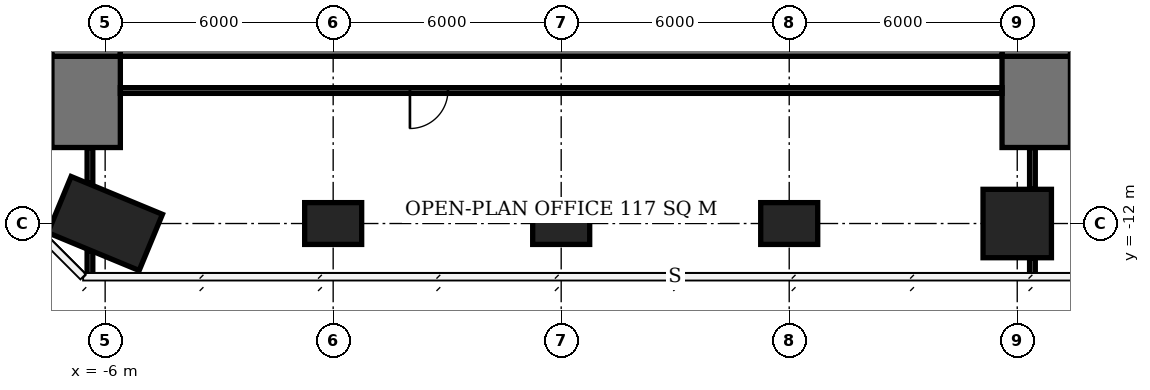
"""IFC4 building model, lengths in metres.
Left out: names, types, materials, properties, quantities, classifications, styles, units other than length and angle.
Written with IfcOpenShell. Run it as: python <this file> out.ifc"""

import sys

from ifc_helpers import new_model, si_unit, direction, frame, frame_2d, origin, origin_2d, place, context, subcontext, project, spatial, rectangle, extrude, element, fill, save


model = new_model("IFC4")
c1 = context("Model", 3, precision=1e-05, world=origin(), true_north=direction((0.0, 1.0)))
c2 = subcontext(c1, "Body", "Model", "MODEL_VIEW")
j1 = project(units=[si_unit("LENGTHUNIT", "METRE"), si_unit("PLANEANGLEUNIT", "RADIAN")], contexts=[c1])
p1 = place(None, origin())
s1 = spatial("IfcSite", under=j1, at=p1, CompositionType="ELEMENT")
p2 = place(p1, origin())
s2 = spatial("IfcBuilding", under=s1, at=p2, CompositionType="ELEMENT")
p3 = place(p2, frame((0.0, 0.0, 185.0)))
s3 = spatial("IfcBuildingStorey", under=s2, at=p3, CompositionType="ELEMENT", Elevation=185.0)
p4 = place(p3, frame((-6.0, -12.0, 0.0), z_axis=(0.0, 0.0, 1.0), x_axis=(-0.923879532511, 0.382683432365, 0.0)))
e1 = element("IfcColumn", 1, at=p4, inside=s3, PredefinedType="COLUMN", context=c2, shape_type="SweptSolid", body=[
    extrude(rectangle(XDim=2.6, YDim=1.6, at=origin_2d()), origin(), (0.0, 0.0, 1.0), 3.9),
])
for number, where, z_axis, x_axis in (
    (2, (0.0, -12.0, 0.0), (0.0, 0.0, 1.0), (1.0, 0.0, 0.0)),
    (3, (6.0, -12.0, 0.0), (0.0, 0.0, 1.0), (1.0, 0.0, 0.0)),
    (4, (12.0, -12.0, 0.0), (0.0, 0.0, 1.0), (1.0, 0.0, 0.0)),
):
    element("IfcColumn", number, at=place(p3, frame(where, z_axis=z_axis, x_axis=x_axis)), inside=s3, PredefinedType="COLUMN", context=c2, shape_type="SweptSolid", body=[
        extrude(rectangle(XDim=1.5, YDim=1.1, at=origin_2d()), origin(), (0.0, 0.0, 1.0), 3.9),
    ])
p5 = place(p3, frame((18.0, -12.0, 0.0), z_axis=(0.0, 0.0, 1.0), x_axis=(1.0, 0.0, 0.0)))
e5 = element("IfcColumn", 5, at=p5, inside=s3, PredefinedType="COLUMN", context=c2, shape_type="SweptSolid", body=[
    extrude(rectangle(XDim=1.8, YDim=1.8, at=origin_2d()), origin(), (0.0, 0.0, 1.0), 3.9),
])
p6 = place(p3, frame((-5.6, -6.6, 0.0), z_axis=(0.0, 0.0, 1.0), x_axis=(1.0, 0.0, 0.0)))
e6 = element("IfcWall", 6, at=p6, inside=s3, PredefinedType="SHEAR", context=c2, shape_type="SweptSolid", body=[
    extrude(rectangle(XDim=23.2, YDim=2.0, at=frame_2d((11.6, 0.0))), origin(), (0.0, 0.0, 1.0), 3.9),
])
p7 = place(p3, frame((-6.5, -7.6, 0.0), z_axis=(0.0, 0.0, 1.0), x_axis=(0.0, 1.0, 0.0)))
e7 = element("IfcWall", 7, at=p7, inside=s3, PredefinedType="SHEAR", context=c2, shape_type="SweptSolid", body=[
    extrude(rectangle(XDim=21.2, YDim=1.8, at=frame_2d((10.6, 0.0))), origin(), (0.0, 0.0, 1.0), 3.9),
])
p8 = place(p7, frame((7.8, 0.0, 0.0)))
e8 = element("IfcOpeningElement", 8, at=p8, cuts=e7, PredefinedType="OPENING", context=c2, shape_type="SweptSolid", body=[
    extrude(rectangle(XDim=1.8, YDim=2.4, at=frame_2d((0.9, 1.2))), frame((0.0, 0.91, 0.0), z_axis=(0.0, -1.0, 0.0), x_axis=(1.0, 0.0, 0.0)), (0.0, 0.0, 1.0), 1.82),
])
p9 = place(p3, frame((18.5, -7.6, 0.0), z_axis=(0.0, 0.0, 1.0), x_axis=(0.0, 1.0, 0.0)))
e9 = element("IfcWall", 9, at=p9, inside=s3, PredefinedType="SHEAR", context=c2, shape_type="SweptSolid", body=[
    extrude(rectangle(XDim=21.2, YDim=1.8, at=frame_2d((10.6, 0.0))), origin(), (0.0, 0.0, 1.0), 3.9),
])
p10 = place(p9, frame((9.2, 0.0, 0.0)))
e10 = element("IfcOpeningElement", 10, at=p10, cuts=e9, PredefinedType="OPENING", context=c2, shape_type="SweptSolid", body=[
    extrude(rectangle(XDim=1.8, YDim=2.4, at=frame_2d((0.9, 1.2))), frame((0.0, 0.91, 0.0), z_axis=(0.0, -1.0, 0.0), x_axis=(1.0, 0.0, 0.0)), (0.0, 0.0, 1.0), 1.82),
])
for number, where, z_axis, x_axis in (
    (11, (-6.5, -10.0, 0.0), (0.0, 0.0, 1.0), (0.0, 1.0, 0.0)),
    (12, (18.5, -10.0, 0.0), (0.0, 0.0, 1.0), (0.0, 1.0, 0.0)),
):
    element("IfcWall", number, at=place(p3, frame(where, z_axis=z_axis, x_axis=x_axis)), inside=s3, PredefinedType="SHEAR", context=c2, shape_type="SweptSolid", body=[
        extrude(rectangle(XDim=2.4, YDim=1.8, at=frame_2d((1.2, 0.0))), origin(), (0.0, 0.0, 1.0), 3.9),
    ])
p11 = place(p3, frame((-6.4, -13.4, 0.0), z_axis=(0.0, 0.0, 1.0), x_axis=(0.0, 1.0, 0.0)))
e13 = element("IfcWall", 13, at=p11, inside=s3, PredefinedType="PARTITIONING", context=c2, shape_type="SweptSolid", body=[
    extrude(rectangle(XDim=0.669, YDim=0.15, at=frame_2d((0.334, 0.0))), origin(), (0.0, 0.0, 1.0), 3.65),
])
p12 = place(p3, frame((-6.4, -10.937, 0.0), z_axis=(0.0, 0.0, 1.0), x_axis=(0.0, 1.0, 0.0)))
e14 = element("IfcWall", 14, at=p12, inside=s3, PredefinedType="PARTITIONING", context=c2, shape_type="SweptSolid", body=[
    extrude(rectangle(XDim=0.937, YDim=0.15, at=frame_2d((0.469, 0.0))), origin(), (0.0, 0.0, 1.0), 3.65),
])
p13 = place(p3, frame((17.6, -8.5, 0.0), z_axis=(0.0, 0.0, 1.0), x_axis=(-1.0, 0.0, 0.0)))
e15 = element("IfcWall", 15, at=p13, inside=s3, PredefinedType="PARTITIONING", context=c2, shape_type="SweptSolid", body=[
    extrude(rectangle(XDim=23.2, YDim=0.15, at=frame_2d((11.6, 0.0))), origin(), (0.0, 0.0, 1.0), 3.65),
])
p14 = place(p13, frame((14.58, 0.0, 0.0)))
e16 = element("IfcOpeningElement", 16, at=p14, cuts=e15, PredefinedType="OPENING", context=c2, shape_type="SweptSolid", body=[
    extrude(rectangle(XDim=1.0, YDim=2.1, at=frame_2d((0.5, 1.05))), frame((0.0, 0.085, 0.0), z_axis=(0.0, -1.0, 0.0), x_axis=(1.0, 0.0, 0.0)), (0.0, 0.0, 1.0), 0.17),
])
p15 = place(p3, frame((18.4, -13.35, 0.0), z_axis=(0.0, 0.0, 1.0), x_axis=(0.0, 1.0, 0.0)))
e17 = element("IfcWall", 17, at=p15, inside=s3, PredefinedType="PARTITIONING", context=c2, shape_type="SweptSolid", body=[
    extrude(rectangle(XDim=0.45, YDim=0.15, at=frame_2d((0.225, 0.0))), origin(), (0.0, 0.0, 1.0), 3.65),
])
p16 = place(p3, frame((18.4, -11.1, 0.0), z_axis=(0.0, 0.0, 1.0), x_axis=(0.0, 1.0, 0.0)))
e18 = element("IfcWall", 18, at=p16, inside=s3, PredefinedType="PARTITIONING", context=c2, shape_type="SweptSolid", body=[
    extrude(rectangle(XDim=1.1, YDim=0.15, at=frame_2d((0.55, 0.0))), origin(), (0.0, 0.0, 1.0), 3.65),
])
p17 = place(p14, origin())
e19 = element("IfcDoor", 19, at=p17, inside=s3, OperationType="SINGLE_SWING_RIGHT", PredefinedType="DOOR", context=c2, shape_type="SweptSolid", body=[
    extrude(rectangle(XDim=1.0, YDim=2.1, at=frame_2d((0.5, 1.05))), frame((0.0, 0.025, 0.0), z_axis=(0.0, -1.0, 0.0), x_axis=(1.0, 0.0, 0.0)), (0.0, 0.0, 1.0), 0.05),
])
fill(e16, e19)
save(model, sys.argv[1])
